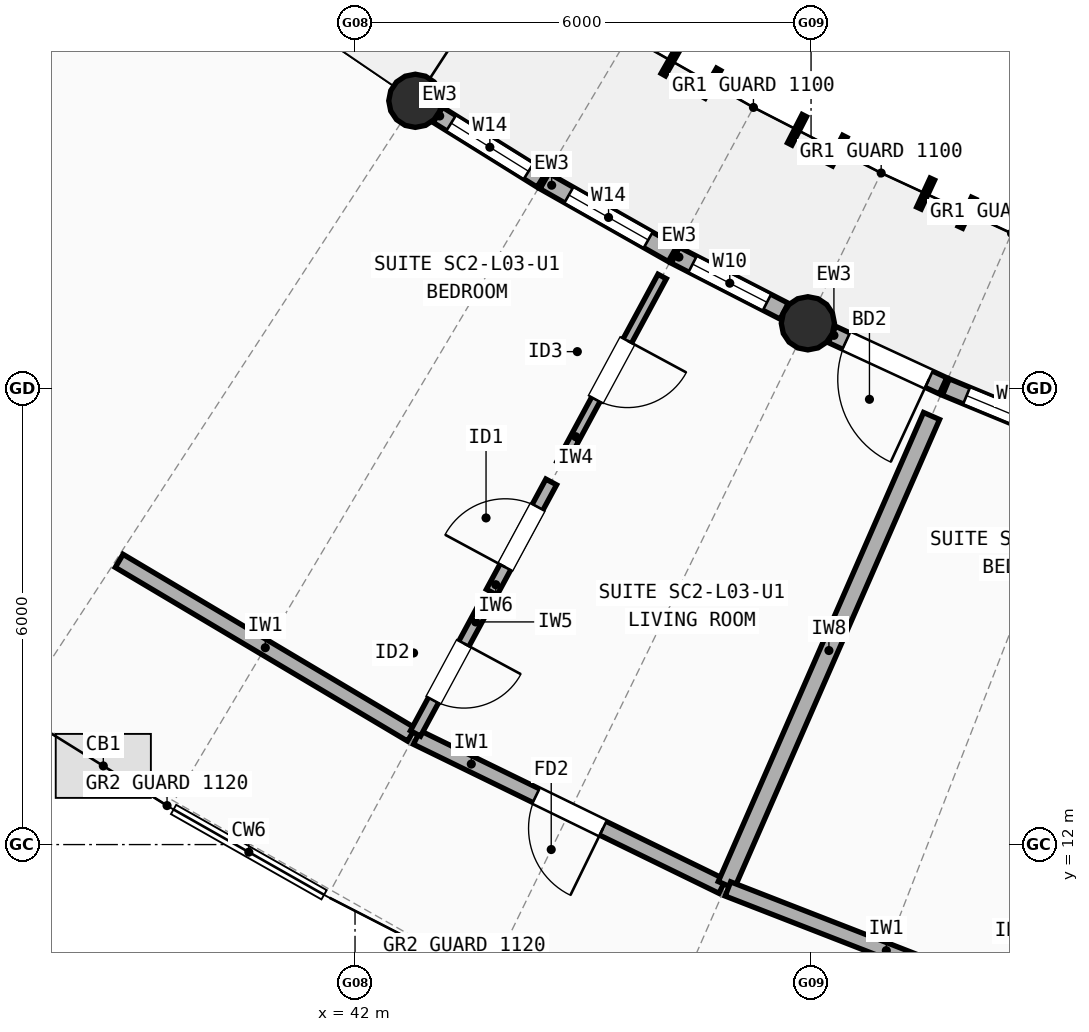
"""IFC4 building model, lengths in metres.
Left out: names, types, materials, properties, quantities, classifications, styles, units other than length and angle.
Written with IfcOpenShell. Run it as: python <this file> out.ifc"""

import sys

from ifc_helpers import new_model, si_unit, direction, frame, frame_2d, origin, origin_2d, place, context, subcontext, project, spatial, rectangle, circle, extrude, element, fill, save


model = new_model("IFC4")
c1 = context("Model", 3, precision=1e-05, world=origin(), true_north=direction((0.0, 1.0)))
c2 = subcontext(c1, "Body", "Model", "MODEL_VIEW")
j1 = project(units=[si_unit("LENGTHUNIT", "METRE"), si_unit("PLANEANGLEUNIT", "RADIAN")], contexts=[c1])
p1 = place(None, origin())
s1 = spatial("IfcSite", under=j1, at=p1, CompositionType="ELEMENT")
p2 = place(p1, origin())
s2 = spatial("IfcBuilding", under=s1, at=p2, CompositionType="ELEMENT")
p3 = place(p2, frame((0.0, 0.0, 10.9)))
s3 = spatial("IfcBuildingStorey", under=s2, at=p3, CompositionType="ELEMENT", Elevation=10.9)
for number, where, z_axis, x_axis in (
    (1, (42.793, 21.785, 0.0), (0.0, 0.0, 1.0), (1.0, 0.0, 0.0)),
    (2, (47.958, 18.858, 0.0), (0.0, 0.0, 1.0), (1.0, 0.0, 0.0)),
    (3, (43.75, 10.229, 0.0), (0.0, 0.0, 1.0), (1.0, 0.0, 0.0)),
):
    element("IfcColumn", number, at=place(p3, frame(where, z_axis=z_axis, x_axis=x_axis)), inside=s3, PredefinedType="COLUMN", context=c2, shape_type="SweptSolid", body=[
        extrude(circle(Radius=0.35, at=origin_2d()), origin(), (0.0, 0.0, 1.0), 2.948),
    ])
p4 = place(p3, frame((43.091, 21.6, 0.0), z_axis=(0.0, 0.0, 1.0), x_axis=(0.848934138406, -0.528498655296, 0.0)))
e4 = element("IfcWall", 4, at=p4, inside=s3, PredefinedType="STANDARD", context=c2, shape_type="SweptSolid", body=[
    extrude(rectangle(XDim=1.61, YDim=0.235, at=frame_2d((0.805, 0.0))), origin(), (0.0, 0.0, 1.0), 2.684),
])
p5 = place(p4, frame((0.205, 0.0, 0.85)))
e5 = element("IfcOpeningElement", 5, at=p5, cuts=e4, PredefinedType="OPENING", context=c2, shape_type="SweptSolid", body=[
    extrude(rectangle(XDim=1.2, YDim=1.5, at=frame_2d((0.6, 0.75))), frame((0.0, 0.127, 0.0), z_axis=(0.0, -1.0, 0.0), x_axis=(1.0, 0.0, 0.0)), (0.0, 0.0, 1.0), 0.255),
])
p6 = place(p3, frame((44.492, 20.729, 0.0), z_axis=(0.0, 0.0, 1.0), x_axis=(0.86993400964, -0.493168144623, 0.0)))
e6 = element("IfcWall", 6, at=p6, inside=s3, PredefinedType="STANDARD", context=c2, shape_type="SweptSolid", body=[
    extrude(rectangle(XDim=1.94, YDim=0.235, at=frame_2d((0.97, 0.0))), origin(), (0.0, 0.0, 1.0), 2.684),
])
p7 = place(p6, frame((0.37, 0.0, 0.85)))
e7 = element("IfcOpeningElement", 7, at=p7, cuts=e6, PredefinedType="OPENING", context=c2, shape_type="SweptSolid", body=[
    extrude(rectangle(XDim=1.2, YDim=1.5, at=frame_2d((0.6, 0.75))), frame((0.0, 0.127, 0.0), z_axis=(0.0, -1.0, 0.0), x_axis=(1.0, 0.0, 0.0)), (0.0, 0.0, 1.0), 0.255),
])
p8 = place(p3, frame((46.215, 19.753, 0.0), z_axis=(0.0, 0.0, 1.0), x_axis=(0.889553696252, -0.456830626693, 0.0)))
e8 = element("IfcWall", 8, at=p8, inside=s3, PredefinedType="STANDARD", context=c2, shape_type="SweptSolid", body=[
    extrude(rectangle(XDim=1.61, YDim=0.235, at=frame_2d((0.805, 0.0))), origin(), (0.0, 0.0, 1.0), 2.684),
])
p9 = place(p8, frame((0.255, 0.0, 0.85)))
e9 = element("IfcOpeningElement", 9, at=p9, cuts=e8, PredefinedType="OPENING", context=c2, shape_type="SweptSolid", body=[
    extrude(rectangle(XDim=1.1, YDim=1.45, at=frame_2d((0.55, 0.725))), frame((0.0, 0.127, 0.0), z_axis=(0.0, -1.0, 0.0), x_axis=(1.0, 0.0, 0.0)), (0.0, 0.0, 1.0), 0.255),
])
p10 = place(p3, frame((48.276, 18.711, 0.0), z_axis=(0.0, 0.0, 1.0), x_axis=(0.907630651946, -0.419769698344, 0.0)))
e10 = element("IfcWall", 10, at=p10, inside=s3, PredefinedType="STANDARD", context=c2, shape_type="SweptSolid", body=[
    extrude(rectangle(XDim=1.61, YDim=0.235, at=frame_2d((0.805, 0.0))), origin(), (0.0, 0.0, 1.0), 2.684),
])
p11 = place(p10, frame((0.205, 0.0, 0.0)))
e11 = element("IfcOpeningElement", 11, at=p11, cuts=e10, PredefinedType="OPENING", context=c2, shape_type="SweptSolid", body=[
    extrude(rectangle(XDim=1.2, YDim=2.15, at=frame_2d((0.6, 1.075))), frame((0.0, 0.127, 0.0), z_axis=(0.0, -1.0, 0.0), x_axis=(1.0, 0.0, 0.0)), (0.0, 0.0, 1.0), 0.255),
])
p12 = place(p3, frame((49.774, 18.019, 0.0), z_axis=(0.0, 0.0, 1.0), x_axis=(0.92414555515, -0.382040564465, 0.0)))
e12 = element("IfcWall", 12, at=p12, inside=s3, PredefinedType="STANDARD", context=c2, shape_type="SweptSolid", body=[
    extrude(rectangle(XDim=1.94, YDim=0.235, at=frame_2d((0.97, 0.0))), origin(), (0.0, 0.0, 1.0), 2.684),
])
p13 = place(p12, frame((0.295, 0.0, 0.85)))
e13 = element("IfcOpeningElement", 13, at=p13, cuts=e12, PredefinedType="OPENING", context=c2, shape_type="SweptSolid", body=[
    extrude(rectangle(XDim=1.35, YDim=1.5, at=frame_2d((0.675, 0.75))), frame((0.0, 0.127, 0.0), z_axis=(0.0, -1.0, 0.0), x_axis=(1.0, 0.0, 0.0)), (0.0, 0.0, 1.0), 0.255),
])
p14 = place(p3, frame((38.897, 15.733, 0.0), z_axis=(0.0, 0.0, 1.0), x_axis=(0.859614290038, -0.510943511909, 0.0)))
e14 = element("IfcWall", 14, at=p14, inside=s3, PredefinedType="SOLIDWALL", context=c2, shape_type="SweptSolid", body=[
    extrude(rectangle(XDim=4.473, YDim=0.2, at=frame_2d((2.236, 0.0))), origin(), (0.0, 0.0, 1.0), 2.722),
])
p15 = place(p3, frame((42.812, 13.409, 0.0), z_axis=(0.0, 0.0, 1.0), x_axis=(0.898794149603, -0.438370934985, 0.0)))
e15 = element("IfcWall", 15, at=p15, inside=s3, PredefinedType="SOLIDWALL", context=c2, shape_type="SweptSolid", body=[
    extrude(rectangle(XDim=4.473, YDim=0.2, at=frame_2d((2.236, 0.0))), origin(), (0.0, 0.0, 1.0), 2.762),
])
p16 = place(p15, frame((1.747, 0.0, 0.0)))
e16 = element("IfcOpeningElement", 16, at=p16, cuts=e15, PredefinedType="OPENING", context=c2, shape_type="SweptSolid", body=[
    extrude(rectangle(XDim=0.98, YDim=2.15, at=frame_2d((0.49, 1.075))), frame((0.0, 0.11, 0.0), z_axis=(0.0, -1.0, 0.0), x_axis=(1.0, 0.0, 0.0)), (0.0, 0.0, 1.0), 0.22),
])
p17 = place(p3, frame((46.041, 19.474, 0.0), z_axis=(0.0, 0.0, 1.0), x_axis=(-0.475103009949, -0.879930184695, 0.0)))
e17 = element("IfcWall", 17, at=p17, inside=s3, PredefinedType="PARTITIONING", context=c2, shape_type="SweptSolid", body=[
    extrude(rectangle(XDim=2.8, YDim=0.125, at=frame_2d((1.4, 0.0))), origin(), (0.0, 0.0, 1.0), 2.742),
])
p18 = place(p17, frame((0.96, 0.0, 0.0)))
e18 = element("IfcOpeningElement", 18, at=p18, cuts=e17, PredefinedType="OPENING", context=c2, shape_type="SweptSolid", body=[
    extrude(rectangle(XDim=0.88, YDim=2.1, at=frame_2d((0.44, 1.05))), frame((0.0, 0.073, 0.0), z_axis=(0.0, -1.0, 0.0), x_axis=(1.0, 0.0, 0.0)), (0.0, 0.0, 1.0), 0.145),
])
p19 = place(p3, frame((44.582, 16.771, 0.0), z_axis=(0.0, 0.0, 1.0), x_axis=(-0.475080097018, -0.879942555749, 0.0)))
e19 = element("IfcWall", 19, at=p19, inside=s3, PredefinedType="PLUMBINGWALL", context=c2, shape_type="SweptSolid", body=[
    extrude(rectangle(XDim=1.648, YDim=0.16, at=frame_2d((0.824, 0.0))), origin(), (0.0, 0.0, 1.0), 2.742),
])
p20 = place(p19, frame((0.374, 0.0, 0.0)))
e20 = element("IfcOpeningElement", 20, at=p20, cuts=e19, PredefinedType="OPENING", context=c2, shape_type="SweptSolid", body=[
    extrude(rectangle(XDim=0.9, YDim=2.1, at=frame_2d((0.45, 1.05))), frame((0.0, 0.09, 0.0), z_axis=(0.0, -1.0, 0.0), x_axis=(1.0, 0.0, 0.0)), (0.0, 0.0, 1.0), 0.18),
])
p21 = place(p3, frame((43.669, 15.081, 0.0), z_axis=(0.0, 0.0, 1.0), x_axis=(-0.475017414672, -0.879976395001, 0.0)))
e21 = element("IfcWall", 21, at=p21, inside=s3, PredefinedType="PARTITIONING", context=c2, shape_type="SweptSolid", body=[
    extrude(rectangle(XDim=1.84, YDim=0.15, at=frame_2d((0.92, 0.0))), origin(), (0.0, 0.0, 1.0), 2.742),
])
p22 = place(p21, frame((0.495, 0.0, 0.0)))
e22 = element("IfcOpeningElement", 22, at=p22, cuts=e21, PredefinedType="OPENING", context=c2, shape_type="SweptSolid", body=[
    extrude(rectangle(XDim=0.85, YDim=2.1, at=frame_2d((0.425, 1.05))), frame((0.0, 0.085, 0.0), z_axis=(0.0, -1.0, 0.0), x_axis=(1.0, 0.0, 0.0)), (0.0, 0.0, 1.0), 0.17),
])
p23 = place(p3, frame((49.585, 17.638, 0.0), z_axis=(0.0, 0.0, 1.0), x_axis=(-0.400932910895, -0.916107417807, 0.0)))
e23 = element("IfcWall", 23, at=p23, inside=s3, PredefinedType="SOLIDWALL", context=c2, shape_type="SweptSolid", body=[
    extrude(rectangle(XDim=6.736, YDim=0.23, at=frame_2d((3.368, 0.0))), origin(), (0.0, 0.0, 1.0), 2.722),
])
p24 = place(p3, frame((46.906, 11.417, 0.0), z_axis=(0.0, 0.0, 1.0), x_axis=(0.931847867525, -0.362849213571, 0.0)))
e24 = element("IfcWall", 24, at=p24, inside=s3, PredefinedType="SOLIDWALL", context=c2, shape_type="SweptSolid", body=[
    extrude(rectangle(XDim=4.473, YDim=0.2, at=frame_2d((2.237, 0.0))), origin(), (0.0, 0.0, 1.0), 2.742),
])
p25 = place(p5, origin())
e25 = element("IfcWindow", 25, at=p25, inside=s3, PartitioningType="SINGLE_PANEL", PredefinedType="WINDOW", context=c2, shape_type="SweptSolid", body=[
    extrude(rectangle(XDim=1.2, YDim=1.5, at=frame_2d((0.6, 0.75))), frame((0.0, 0.03, 0.0), z_axis=(0.0, -1.0, 0.0), x_axis=(1.0, 0.0, 0.0)), (0.0, 0.0, 1.0), 0.06),
])
fill(e5, e25)
p26 = place(p7, origin())
e26 = element("IfcWindow", 26, at=p26, inside=s3, PartitioningType="SINGLE_PANEL", PredefinedType="WINDOW", context=c2, shape_type="SweptSolid", body=[
    extrude(rectangle(XDim=1.2, YDim=1.5, at=frame_2d((0.6, 0.75))), frame((0.0, 0.03, 0.0), z_axis=(0.0, -1.0, 0.0), x_axis=(1.0, 0.0, 0.0)), (0.0, 0.0, 1.0), 0.06),
])
fill(e7, e26)
p27 = place(p9, origin())
e27 = element("IfcWindow", 27, at=p27, inside=s3, PartitioningType="SINGLE_PANEL", PredefinedType="WINDOW", context=c2, shape_type="SweptSolid", body=[
    extrude(rectangle(XDim=1.1, YDim=1.45, at=frame_2d((0.55, 0.725))), frame((0.0, 0.03, 0.0), z_axis=(0.0, -1.0, 0.0), x_axis=(1.0, 0.0, 0.0)), (0.0, 0.0, 1.0), 0.06),
])
fill(e9, e27)
p28 = place(p11, origin())
e28 = element("IfcDoor", 28, at=p28, inside=s3, OperationType="SINGLE_SWING_RIGHT", PredefinedType="DOOR", context=c2, shape_type="SweptSolid", body=[
    extrude(rectangle(XDim=1.2, YDim=2.15, at=frame_2d((0.6, 1.075))), frame((0.0, 0.025, 0.0), z_axis=(0.0, -1.0, 0.0), x_axis=(1.0, 0.0, 0.0)), (0.0, 0.0, 1.0), 0.05),
])
fill(e11, e28)
p29 = place(p13, origin())
e29 = element("IfcWindow", 29, at=p29, inside=s3, PartitioningType="SINGLE_PANEL", PredefinedType="WINDOW", context=c2, shape_type="SweptSolid", body=[
    extrude(rectangle(XDim=1.35, YDim=1.5, at=frame_2d((0.675, 0.75))), frame((0.0, 0.03, 0.0), z_axis=(0.0, -1.0, 0.0), x_axis=(1.0, 0.0, 0.0)), (0.0, 0.0, 1.0), 0.06),
])
fill(e13, e29)
p30 = place(p16, origin())
e30 = element("IfcDoor", 30, at=p30, inside=s3, OperationType="SINGLE_SWING_RIGHT", PredefinedType="DOOR", context=c2, shape_type="SweptSolid", body=[
    extrude(rectangle(XDim=0.98, YDim=2.15, at=frame_2d((0.49, 1.075))), frame((0.0, 0.025, 0.0), z_axis=(0.0, -1.0, 0.0), x_axis=(1.0, 0.0, 0.0)), (0.0, 0.0, 1.0), 0.05),
])
fill(e16, e30)
p31 = place(p18, origin())
e31 = element("IfcDoor", 31, at=p31, inside=s3, OperationType="SINGLE_SWING_LEFT", PredefinedType="DOOR", context=c2, shape_type="SweptSolid", body=[
    extrude(rectangle(XDim=0.88, YDim=2.1, at=frame_2d((0.44, 1.05))), frame((0.0, 0.025, 0.0), z_axis=(0.0, -1.0, 0.0), x_axis=(1.0, 0.0, 0.0)), (0.0, 0.0, 1.0), 0.05),
])
fill(e18, e31)
p32 = place(p20, origin())
e32 = element("IfcDoor", 32, at=p32, inside=s3, OperationType="SINGLE_SWING_RIGHT", PredefinedType="DOOR", context=c2, shape_type="SweptSolid", body=[
    extrude(rectangle(XDim=0.9, YDim=2.1, at=frame_2d((0.45, 1.05))), frame((0.0, 0.025, 0.0), z_axis=(0.0, -1.0, 0.0), x_axis=(1.0, 0.0, 0.0)), (0.0, 0.0, 1.0), 0.05),
])
fill(e20, e32)
p33 = place(p22, origin())
e33 = element("IfcDoor", 33, at=p33, inside=s3, OperationType="SINGLE_SWING_LEFT", PredefinedType="DOOR", context=c2, shape_type="SweptSolid", body=[
    extrude(rectangle(XDim=0.85, YDim=2.1, at=frame_2d((0.425, 1.05))), frame((0.0, 0.025, 0.0), z_axis=(0.0, -1.0, 0.0), x_axis=(1.0, 0.0, 0.0)), (0.0, 0.0, 1.0), 0.05),
])
fill(e22, e33)
save(model, sys.argv[1])
